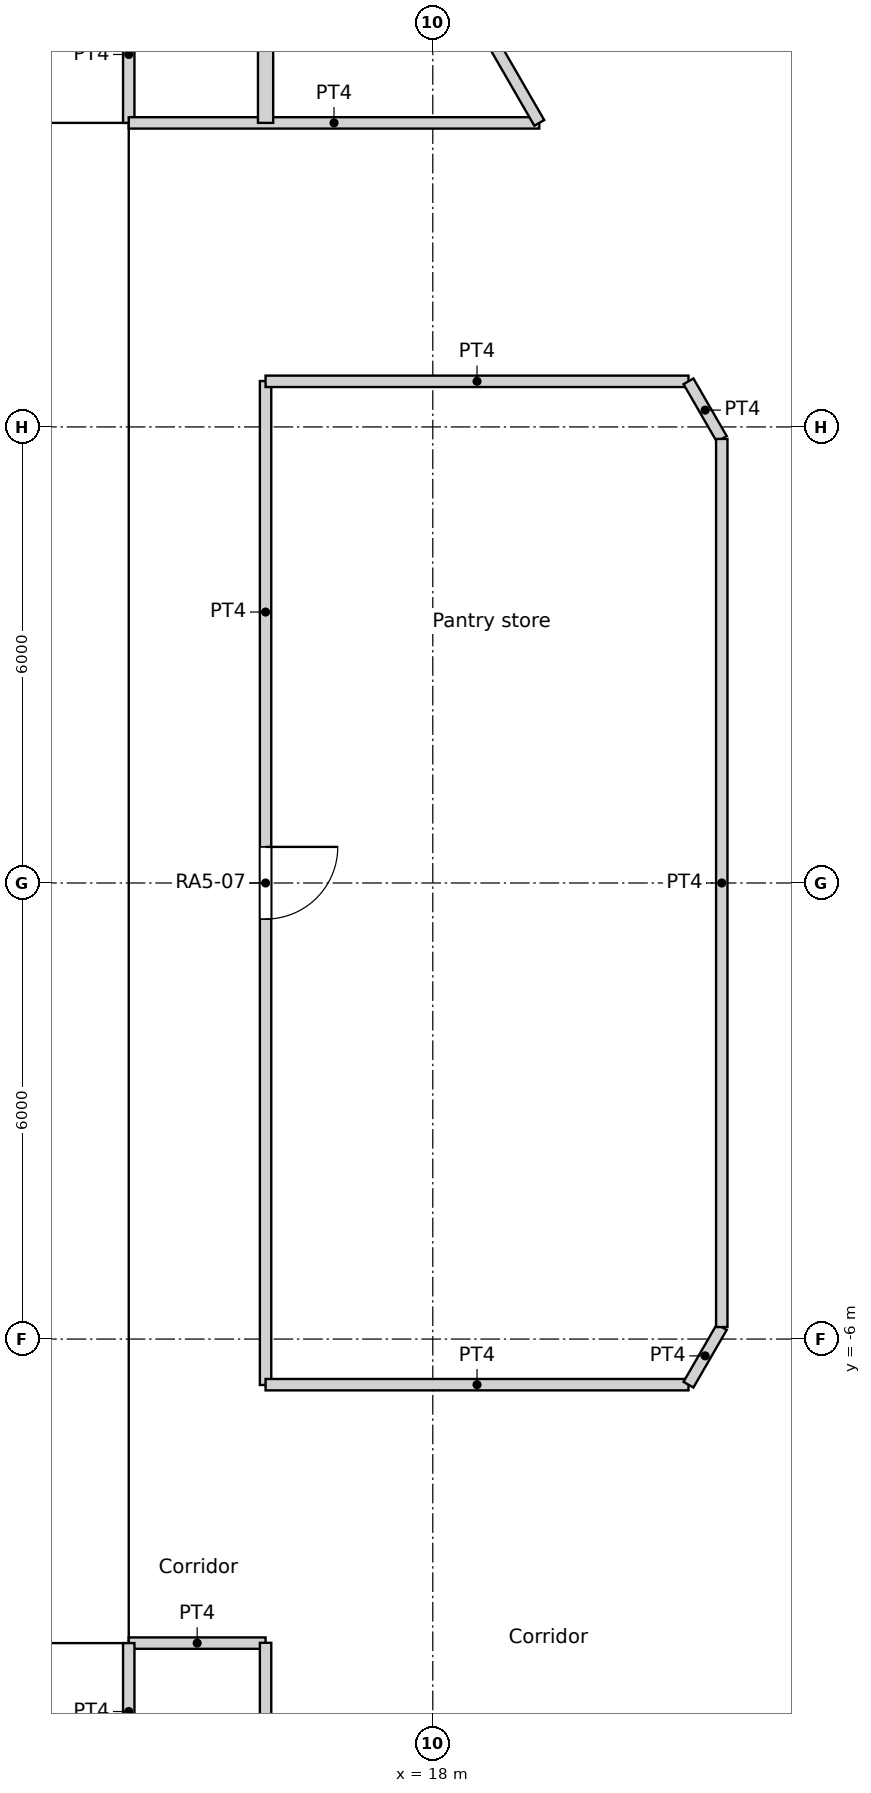
"""IFC4 building model, lengths in metres.
Left out: names, types, materials, properties, quantities, classifications, styles, units other than length and angle.
Written with IfcOpenShell. Run it as: python <this file> out.ifc"""

import sys

from ifc_helpers import new_model, si_unit, direction, frame, frame_2d, origin, origin_2d, place, context, subcontext, project, spatial, rectangle, circle, extrude, element, fill, save


model = new_model("IFC4")
c1 = context("Model", 3, precision=1e-05, world=origin(), true_north=direction((0.0, 1.0)))
c2 = subcontext(c1, "Body", "Model", "MODEL_VIEW")
j1 = project(units=[si_unit("LENGTHUNIT", "METRE"), si_unit("PLANEANGLEUNIT", "RADIAN")], contexts=[c1])
p1 = place(None, origin())
s1 = spatial("IfcSite", under=j1, at=p1, CompositionType="ELEMENT")
p2 = place(p1, origin())
s2 = spatial("IfcBuilding", under=s1, at=p2, CompositionType="ELEMENT")
p3 = place(p2, frame((0.0, 0.0, 71.4)))
s3 = spatial("IfcBuildingStorey", under=s2, at=p3, CompositionType="ELEMENT", Elevation=71.4)
for number, where, z_axis, x_axis in (
    (1, (21.937, 11.017, 0.0), (0.0, 0.0, 1.0), (1.0, 0.0, 0.0)),
    (2, (21.937, -11.017, 0.0), (0.0, 0.0, 1.0), (1.0, 0.0, 0.0)),
):
    element("IfcColumn", number, at=place(p3, frame(where, z_axis=z_axis, x_axis=x_axis)), inside=s3, PredefinedType="COLUMN", context=c2, shape_type="SweptSolid", body=[
        extrude(circle(Radius=0.65, at=origin_2d()), origin(), (0.0, 0.0, 1.0), 3.6),
    ])
for number, where, z_axis, x_axis in (
    (3, (18.822, 0.0, 0.0), (0.0, 0.0, 1.0), (1.0, 0.0, 0.0)),
    (4, (17.986, 5.548, 0.0), (0.0, 0.0, 1.0), (1.0, 0.0, 0.0)),
    (5, (15.552, 10.603, 0.0), (0.0, 0.0, 1.0), (1.0, 0.0, 0.0)),
    (6, (15.552, -10.603, 0.0), (0.0, 0.0, 1.0), (1.0, 0.0, 0.0)),
    (7, (17.986, -5.548, 0.0), (0.0, 0.0, 1.0), (1.0, 0.0, 0.0)),
):
    element("IfcColumn", number, at=place(p3, frame(where, z_axis=z_axis, x_axis=x_axis)), inside=s3, PredefinedType="COLUMN", context=c2, shape_type="SweptSolid", body=[
        extrude(circle(Radius=0.7, at=origin_2d()), origin(), (0.0, 0.0, 1.0), 3.6),
    ])
p4 = place(p3, frame((-14.0, -9.4, 0.0), z_axis=(0.0, 0.0, 1.0), x_axis=(1.0, 0.0, 0.0)))
e8 = element("IfcWall", 8, at=p4, inside=s3, PredefinedType="SOLIDWALL", context=c2, shape_type="SweptSolid", body=[
    extrude(rectangle(XDim=28.0, YDim=1.2, at=frame_2d((14.0, 0.0))), origin(), (0.0, 0.0, 1.0), 3.6),
])
p5 = place(p4, frame((14.9, 0.0, 0.0)))
e9 = element("IfcOpeningElement", 9, at=p5, cuts=e8, PredefinedType="OPENING", context=c2, shape_type="SweptSolid", body=[
    extrude(rectangle(XDim=1.0, YDim=2.1, at=frame_2d((0.5, 1.05))), frame((0.0, 0.6, 0.0), z_axis=(0.0, -1.0, 0.0), x_axis=(1.0, 0.0, 0.0)), (0.0, 0.0, 1.0), 1.2),
])
p6 = place(p4, frame((9.8, 0.0, 0.0)))
e10 = element("IfcOpeningElement", 10, at=p6, cuts=e8, PredefinedType="OPENING", context=c2, shape_type="SweptSolid", body=[
    extrude(rectangle(XDim=1.8, YDim=2.1, at=frame_2d((0.9, 1.05))), frame((0.0, 0.6, 0.0), z_axis=(0.0, -1.0, 0.0), x_axis=(1.0, 0.0, 0.0)), (0.0, 0.0, 1.0), 1.2),
])
p7 = place(p4, frame((16.4, 0.0, 0.0)))
e11 = element("IfcOpeningElement", 11, at=p7, cuts=e8, PredefinedType="OPENING", context=c2, shape_type="SweptSolid", body=[
    extrude(rectangle(XDim=1.8, YDim=2.1, at=frame_2d((0.9, 1.05))), frame((0.0, 0.6, 0.0), z_axis=(0.0, -1.0, 0.0), x_axis=(1.0, 0.0, 0.0)), (0.0, 0.0, 1.0), 1.2),
])
p8 = place(p3, frame((-14.0, 9.4, 0.0), z_axis=(0.0, 0.0, 1.0), x_axis=(1.0, 0.0, 0.0)))
e12 = element("IfcWall", 12, at=p8, inside=s3, PredefinedType="SOLIDWALL", context=c2, shape_type="SweptSolid", body=[
    extrude(rectangle(XDim=28.0, YDim=1.2, at=frame_2d((14.0, 0.0))), origin(), (0.0, 0.0, 1.0), 3.6),
])
p9 = place(p8, frame((9.8, 0.0, 0.0)))
e13 = element("IfcOpeningElement", 13, at=p9, cuts=e12, PredefinedType="OPENING", context=c2, shape_type="SweptSolid", body=[
    extrude(rectangle(XDim=1.8, YDim=2.1, at=frame_2d((0.9, 1.05))), frame((0.0, 0.6, 0.0), z_axis=(0.0, -1.0, 0.0), x_axis=(1.0, 0.0, 0.0)), (0.0, 0.0, 1.0), 1.2),
])
p10 = place(p3, frame((13.4, -8.8, 0.0), z_axis=(0.0, 0.0, 1.0), x_axis=(0.0, 1.0, 0.0)))
e14 = element("IfcWall", 14, at=p10, inside=s3, PredefinedType="SOLIDWALL", context=c2, shape_type="SweptSolid", body=[
    extrude(rectangle(XDim=17.6, YDim=1.2, at=frame_2d((8.8, 0.0))), origin(), (0.0, 0.0, 1.0), 3.6),
])
p11 = place(p10, frame((6.3, 0.0, 0.0)))
e15 = element("IfcOpeningElement", 15, at=p11, cuts=e14, PredefinedType="OPENING", context=c2, shape_type="SweptSolid", body=[
    extrude(rectangle(XDim=1.0, YDim=2.1, at=frame_2d((0.5, 1.05))), frame((0.0, 0.6, 0.0), z_axis=(0.0, -1.0, 0.0), x_axis=(1.0, 0.0, 0.0)), (0.0, 0.0, 1.0), 1.2),
])
for number, where, z_axis, x_axis in (
    (16, (14.0, 10.0, 0.0), (0.0, 0.0, 1.0), (0.0, 1.0, 0.0)),
    (17, (14.0, -11.8, 0.0), (0.0, 0.0, 1.0), (0.0, 1.0, 0.0)),
):
    element("IfcWall", number, at=place(p3, frame(where, z_axis=z_axis, x_axis=x_axis)), inside=s3, PredefinedType="PARTITIONING", context=c2, shape_type="SweptSolid", body=[
        extrude(rectangle(XDim=1.8, YDim=0.15, at=frame_2d((0.9, 0.0))), origin(), (0.0, 0.0, 1.0), 3.15),
    ])
p12 = place(p3, frame((14.0, 10.0, 0.0), z_axis=(0.0, 0.0, 1.0), x_axis=(1.0, 0.0, 0.0)))
e18 = element("IfcWall", 18, at=p12, inside=s3, PredefinedType="PARTITIONING", context=c2, shape_type="SweptSolid", body=[
    extrude(rectangle(XDim=5.401, YDim=0.15, at=frame_2d((2.7, 0.0))), origin(), (0.0, 0.0, 1.0), 3.15),
])
p13 = place(p3, frame((14.0, -10.0, 0.0), z_axis=(0.0, 0.0, 1.0), x_axis=(1.0, 0.0, 0.0)))
e19 = element("IfcWall", 19, at=p13, inside=s3, PredefinedType="PARTITIONING", context=c2, shape_type="SweptSolid", body=[
    extrude(rectangle(XDim=1.8, YDim=0.15, at=frame_2d((0.9, 0.0))), origin(), (0.0, 0.0, 1.0), 3.15),
])
p14 = place(p3, frame((15.8, -6.604, 0.0), z_axis=(0.0, 0.0, 1.0), x_axis=(0.0, 1.0, 0.0)))
e20 = element("IfcWall", 20, at=p14, inside=s3, PredefinedType="PARTITIONING", context=c2, shape_type="SweptSolid", body=[
    extrude(rectangle(XDim=13.208, YDim=0.15, at=frame_2d((6.604, 0.0))), origin(), (0.0, 0.0, 1.0), 3.15),
])
p15 = place(p14, frame((6.129, 0.0, 0.0)))
e21 = element("IfcOpeningElement", 21, at=p15, cuts=e20, PredefinedType="OPENING", context=c2, shape_type="SweptSolid", body=[
    extrude(rectangle(XDim=0.95, YDim=2.1, at=frame_2d((0.475, 1.05))), frame((0.0, 0.075, 0.0), z_axis=(0.0, -1.0, 0.0), x_axis=(1.0, 0.0, 0.0)), (0.0, 0.0, 1.0), 0.15),
])
p16 = place(p3, frame((15.8, -16.053, 0.0), z_axis=(0.0, 0.0, 1.0), x_axis=(0.0, 1.0, 0.0)))
e22 = element("IfcWall", 22, at=p16, inside=s3, PredefinedType="PARTITIONING", context=c2, shape_type="SweptSolid", body=[
    extrude(rectangle(XDim=6.057, YDim=0.15, at=frame_2d((3.028, 0.0))), origin(), (0.0, 0.0, 1.0), 3.15),
])
p17 = place(p3, frame((15.8, -6.6, 0.0), z_axis=(0.0, 0.0, 1.0), x_axis=(1.0, 0.0, 0.0)))
e23 = element("IfcWall", 23, at=p17, inside=s3, PredefinedType="PARTITIONING", context=c2, shape_type="SweptSolid", body=[
    extrude(rectangle(XDim=5.564, YDim=0.15, at=frame_2d((2.782, 0.0))), origin(), (0.0, 0.0, 1.0), 3.15),
])
p18 = place(p3, frame((21.364, -6.6, 0.0), z_axis=(0.0, 0.0, 1.0), x_axis=(0.500277597875, 0.865865073245, 0.0)))
e24 = element("IfcWall", 24, at=p18, inside=s3, PredefinedType="PARTITIONING", context=c2, shape_type="SweptSolid", body=[
    extrude(rectangle(XDim=0.875, YDim=0.15, at=frame_2d((0.438, 0.0))), origin(), (0.0, 0.0, 1.0), 3.15),
])
p19 = place(p3, frame((21.802, -5.842, 0.0), z_axis=(0.0, 0.0, 1.0), x_axis=(0.0, 1.0, 0.0)))
e25 = element("IfcWall", 25, at=p19, inside=s3, PredefinedType="PARTITIONING", context=c2, shape_type="SweptSolid", body=[
    extrude(rectangle(XDim=11.684, YDim=0.15, at=frame_2d((5.842, 0.0))), origin(), (0.0, 0.0, 1.0), 3.15),
])
p20 = place(p3, frame((21.364, 6.6, 0.0), z_axis=(0.0, 0.0, 1.0), x_axis=(0.500277597875, -0.865865073245, 0.0)))
e26 = element("IfcWall", 26, at=p20, inside=s3, PredefinedType="PARTITIONING", context=c2, shape_type="SweptSolid", body=[
    extrude(rectangle(XDim=0.875, YDim=0.15, at=frame_2d((0.438, 0.0))), origin(), (0.0, 0.0, 1.0), 3.15),
])
p21 = place(p3, frame((15.8, 6.6, 0.0), z_axis=(0.0, 0.0, 1.0), x_axis=(1.0, 0.0, 0.0)))
e27 = element("IfcWall", 27, at=p21, inside=s3, PredefinedType="PARTITIONING", context=c2, shape_type="SweptSolid", body=[
    extrude(rectangle(XDim=5.564, YDim=0.15, at=frame_2d((2.782, 0.0))), origin(), (0.0, 0.0, 1.0), 3.15),
])
p22 = place(p3, frame((15.96, 15.96, 0.0), z_axis=(0.0, 0.0, 1.0), x_axis=(0.499992689227, -0.86602962462, 0.0)))
e28 = element("IfcWall", 28, at=p22, inside=s3, PredefinedType="PARTITIONING", context=c2, shape_type="SweptSolid", body=[
    extrude(rectangle(XDim=6.882, YDim=0.15, at=frame_2d((3.441, 0.0))), origin(), (0.0, 0.0, 1.0), 3.15),
])
p23 = place(p22, frame((2.941, 0.0, 0.0)))
e29 = element("IfcOpeningElement", 29, at=p23, cuts=e28, PredefinedType="OPENING", context=c2, shape_type="SweptSolid", body=[
    extrude(rectangle(XDim=1.0, YDim=2.04, at=frame_2d((0.5, 1.02))), frame((0.0, 0.075, 0.0), z_axis=(0.0, -1.0, 0.0), x_axis=(1.0, 0.0, 0.0)), (0.0, 0.0, 1.0), 0.15),
])
p24 = place(p3, frame((22.14, 14.229, 0.0), z_axis=(0.0, 0.0, 1.0), x_axis=(0.281780364869, -0.959478934617, 0.0)))
e30 = element("IfcWall", 30, at=p24, inside=s3, PredefinedType="PARTITIONING", context=c2, shape_type="SweptSolid", body=[
    extrude(rectangle(XDim=14.83, YDim=0.15, at=frame_2d((7.415, 0.0))), origin(), (0.0, 0.0, 1.0), 3.15),
])
p25 = place(p24, frame((10.816, 0.0, 0.0)))
e31 = element("IfcOpeningElement", 31, at=p25, cuts=e30, PredefinedType="OPENING", context=c2, shape_type="SweptSolid", body=[
    extrude(rectangle(XDim=1.0, YDim=2.1, at=frame_2d((0.5, 1.05))), frame((0.0, 0.075, 0.0), z_axis=(0.0, -1.0, 0.0), x_axis=(1.0, 0.0, 0.0)), (0.0, 0.0, 1.0), 0.15),
])
p26 = place(p24, frame((5.953, 0.0, 0.0)))
e32 = element("IfcOpeningElement", 32, at=p26, cuts=e30, PredefinedType="OPENING", context=c2, shape_type="SweptSolid", body=[
    extrude(rectangle(XDim=1.0, YDim=2.1, at=frame_2d((0.5, 1.05))), frame((0.0, 0.075, 0.0), z_axis=(0.0, -1.0, 0.0), x_axis=(1.0, 0.0, 0.0)), (0.0, 0.0, 1.0), 0.15),
])
p27 = place(p24, frame((1.033, 0.0, 0.0)))
e33 = element("IfcOpeningElement", 33, at=p27, cuts=e30, PredefinedType="OPENING", context=c2, shape_type="SweptSolid", body=[
    extrude(rectangle(XDim=1.0, YDim=2.1, at=frame_2d((0.5, 1.05))), frame((0.0, 0.075, 0.0), z_axis=(0.0, -1.0, 0.0), x_axis=(1.0, 0.0, 0.0)), (0.0, 0.0, 1.0), 0.15),
])
p28 = place(p3, frame((22.141, -14.229, 0.0), z_axis=(0.0, 0.0, 1.0), x_axis=(0.281765208947, 0.959483385488, 0.0)))
e34 = element("IfcWall", 34, at=p28, inside=s3, PredefinedType="PARTITIONING", context=c2, shape_type="SweptSolid", body=[
    extrude(rectangle(XDim=14.83, YDim=0.15, at=frame_2d((7.415, 0.0))), origin(), (0.0, 0.0, 1.0), 3.15),
])
p29 = place(p28, frame((1.033, 0.0, 0.0)))
e35 = element("IfcOpeningElement", 35, at=p29, cuts=e34, PredefinedType="OPENING", context=c2, shape_type="SweptSolid", body=[
    extrude(rectangle(XDim=1.0, YDim=2.1, at=frame_2d((0.5, 1.05))), frame((0.0, 0.075, 0.0), z_axis=(0.0, -1.0, 0.0), x_axis=(1.0, 0.0, 0.0)), (0.0, 0.0, 1.0), 0.15),
])
p30 = place(p28, frame((9.765, 0.0, 0.0)))
e36 = element("IfcOpeningElement", 36, at=p30, cuts=e34, PredefinedType="OPENING", context=c2, shape_type="SweptSolid", body=[
    extrude(rectangle(XDim=1.8, YDim=2.1, at=frame_2d((0.9, 1.05))), frame((0.0, 0.075, 0.0), z_axis=(0.0, -1.0, 0.0), x_axis=(1.0, 0.0, 0.0)), (0.0, 0.0, 1.0), 0.15),
])
p31 = place(p3, frame((15.8, 10.0, 0.0), z_axis=(0.0, 0.0, 1.0), x_axis=(0.0, 1.0, 0.0)))
e37 = element("IfcWall", 37, at=p31, inside=s3, PredefinedType="PARTITIONING", context=c2, shape_type="SweptSolid", body=[
    extrude(rectangle(XDim=6.053, YDim=0.2, at=frame_2d((3.026, 0.0))), origin(), (0.0, 0.0, 1.0), 3.15),
])
p32 = place(p11, origin())
e38 = element("IfcDoor", 38, at=p32, inside=s3, OperationType="DOUBLE_DOOR_SINGLE_SWING", PredefinedType="DOOR", context=c2, shape_type="SweptSolid", body=[
    extrude(rectangle(XDim=1.0, YDim=2.1, at=frame_2d((0.5, 1.05))), frame((0.0, 0.025, 0.0), z_axis=(0.0, -1.0, 0.0), x_axis=(1.0, 0.0, 0.0)), (0.0, 0.0, 1.0), 0.05),
])
fill(e15, e38)
p33 = place(p15, origin())
e39 = element("IfcDoor", 39, at=p33, inside=s3, OperationType="SINGLE_SWING_LEFT", PredefinedType="DOOR", context=c2, shape_type="SweptSolid", body=[
    extrude(rectangle(XDim=0.95, YDim=2.1, at=frame_2d((0.475, 1.05))), frame((0.0, 0.025, 0.0), z_axis=(0.0, -1.0, 0.0), x_axis=(1.0, 0.0, 0.0)), (0.0, 0.0, 1.0), 0.05),
])
fill(e21, e39)
save(model, sys.argv[1])
